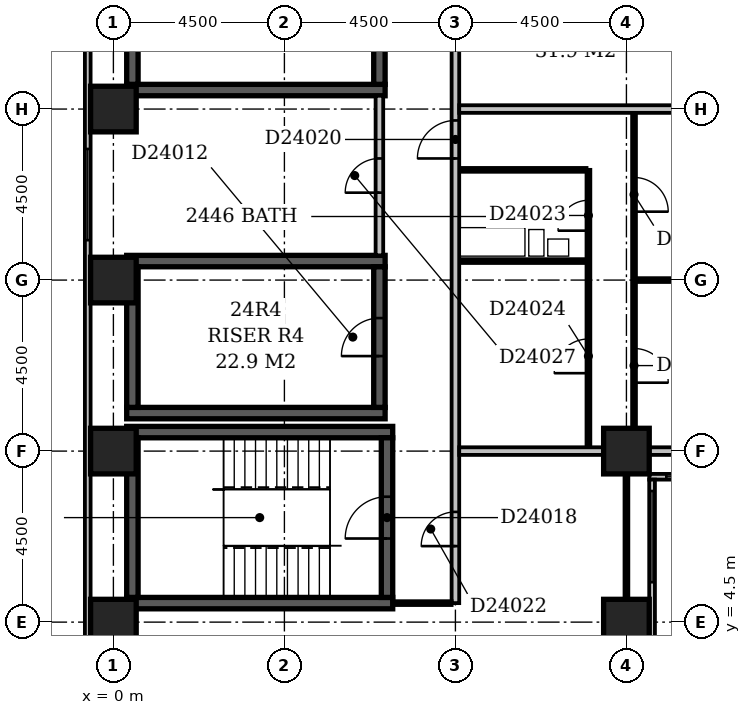
"""IFC4 building model, lengths in metres.
Left out: names, types, materials, properties, quantities, classifications, styles, units other than length and angle.
Written with IfcOpenShell. Run it as: python <this file> out.ifc"""

import sys

from ifc_helpers import new_model, si_unit, direction, frame, frame_2d, origin, origin_2d, place, context, subcontext, project, spatial, rectangle, extrude, element, fill, save


model = new_model("IFC4")
c1 = context("Model", 3, precision=1e-05, world=origin(), true_north=direction((0.0, 1.0)))
c2 = subcontext(c1, "Body", "Model", "MODEL_VIEW")
j1 = project(units=[si_unit("LENGTHUNIT", "METRE"), si_unit("PLANEANGLEUNIT", "RADIAN")], contexts=[c1])
p1 = place(None, origin())
s1 = spatial("IfcSite", under=j1, at=p1, CompositionType="ELEMENT")
p2 = place(p1, origin())
s2 = spatial("IfcBuilding", under=s1, at=p2, CompositionType="ELEMENT")
p3 = place(p2, frame((0.0, 0.0, 97.4)))
s3 = spatial("IfcBuildingStorey", under=s2, at=p3, CompositionType="ELEMENT", Elevation=97.4)
for number, where, z_axis, x_axis in (
    (1, (0.35, 5.0, -0.3), (0.0, 0.0, 1.0), (1.0, 0.0, 0.0)),
    (2, (0.35, 9.5, -0.3), (0.0, 0.0, 1.0), (1.0, 0.0, 0.0)),
):
    element("IfcWall", number, at=place(p3, frame(where, z_axis=z_axis, x_axis=x_axis)), inside=s3, PredefinedType="SHEAR", context=c2, shape_type="SweptSolid", body=[
        extrude(rectangle(XDim=7.0, YDim=0.3, at=frame_2d((3.5, 0.0))), origin(), (0.0, 0.0, 1.0), 3.6),
    ])
for number, where, z_axis, x_axis in (
    (3, (0.35, 10.0, -0.3), (0.0, 0.0, 1.0), (1.0, 0.0, 0.0)),
    (4, (0.35, 14.0, -0.3), (0.0, 0.0, 1.0), (1.0, 0.0, 0.0)),
    (5, (0.35, 18.5, -0.3), (0.0, 0.0, 1.0), (1.0, 0.0, 0.0)),
):
    element("IfcWall", number, at=place(p3, frame(where, z_axis=z_axis, x_axis=x_axis)), inside=s3, PredefinedType="SHEAR", context=c2, shape_type="SweptSolid", body=[
        extrude(rectangle(XDim=6.8, YDim=0.3, at=frame_2d((3.4, 0.0))), origin(), (0.0, 0.0, 1.0), 3.6),
    ])
p4 = place(p3, frame((0.5, 5.15, -0.3), z_axis=(0.0, 0.0, 1.0), x_axis=(0.0, 1.0, 0.0)))
e6 = element("IfcWall", 6, at=p4, inside=s3, PredefinedType="SHEAR", context=c2, shape_type="SweptSolid", body=[
    extrude(rectangle(XDim=4.2, YDim=0.3, at=frame_2d((2.1, 0.0))), origin(), (0.0, 0.0, 1.0), 3.6),
])
for number, where, z_axis, x_axis in (
    (7, (0.5, 10.15, -0.3), (0.0, 0.0, 1.0), (0.0, 1.0, 0.0)),
    (8, (0.5, 18.65, -0.3), (0.0, 0.0, 1.0), (0.0, 1.0, 0.0)),
):
    element("IfcWall", number, at=place(p3, frame(where, z_axis=z_axis, x_axis=x_axis)), inside=s3, PredefinedType="SHEAR", context=c2, shape_type="SweptSolid", body=[
        extrude(rectangle(XDim=3.7, YDim=0.3, at=frame_2d((1.85, 0.0))), origin(), (0.0, 0.0, 1.0), 3.6),
    ])
p5 = place(p3, frame((7.0, 10.15, -0.3), z_axis=(0.0, 0.0, 1.0), x_axis=(0.0, 1.0, 0.0)))
e9 = element("IfcWall", 9, at=p5, inside=s3, PredefinedType="SHEAR", context=c2, shape_type="SweptSolid", body=[
    extrude(rectangle(XDim=3.7, YDim=0.3, at=frame_2d((1.85, 0.0))), origin(), (0.0, 0.0, 1.0), 3.6),
])
p6 = place(p5, frame((1.35, 0.0, 0.3)))
e10 = element("IfcOpeningElement", 10, at=p6, cuts=e9, PredefinedType="OPENING", context=c2, shape_type="SweptSolid", body=[
    extrude(rectangle(XDim=1.0, YDim=2.1, at=frame_2d((0.5, 1.05))), frame((0.0, 0.162, 0.0), z_axis=(0.0, -1.0, 0.0), x_axis=(1.0, 0.0, 0.0)), (0.0, 0.0, 1.0), 0.324),
])
p7 = place(p3, frame((7.0, 18.65, -0.3), z_axis=(0.0, 0.0, 1.0), x_axis=(0.0, 1.0, 0.0)))
e11 = element("IfcWall", 11, at=p7, inside=s3, PredefinedType="SHEAR", context=c2, shape_type="SweptSolid", body=[
    extrude(rectangle(XDim=3.7, YDim=0.3, at=frame_2d((1.85, 0.0))), origin(), (0.0, 0.0, 1.0), 3.6),
])
p8 = place(p7, frame((1.35, 0.0, 0.3)))
e12 = element("IfcOpeningElement", 12, at=p8, cuts=e11, PredefinedType="OPENING", context=c2, shape_type="SweptSolid", body=[
    extrude(rectangle(XDim=1.0, YDim=2.1, at=frame_2d((0.5, 1.05))), frame((0.0, 0.162, 0.0), z_axis=(0.0, -1.0, 0.0), x_axis=(1.0, 0.0, 0.0)), (0.0, 0.0, 1.0), 0.324),
])
p9 = place(p3, frame((7.2, 5.15, -0.3), z_axis=(0.0, 0.0, 1.0), x_axis=(0.0, 1.0, 0.0)))
e13 = element("IfcWall", 13, at=p9, inside=s3, PredefinedType="SHEAR", context=c2, shape_type="SweptSolid", body=[
    extrude(rectangle(XDim=4.2, YDim=0.3, at=frame_2d((2.1, 0.0))), origin(), (0.0, 0.0, 1.0), 3.6),
])
p10 = place(p9, frame((1.55, 0.0, 0.3)))
e14 = element("IfcOpeningElement", 14, at=p10, cuts=e13, PredefinedType="OPENING", context=c2, shape_type="SweptSolid", body=[
    extrude(rectangle(XDim=1.1, YDim=2.1, at=frame_2d((0.55, 1.05))), frame((0.0, 0.162, 0.0), z_axis=(0.0, -1.0, 0.0), x_axis=(1.0, 0.0, 0.0)), (0.0, 0.0, 1.0), 0.324),
])
for number, where, z_axis, x_axis in (
    (15, (0.0, 4.5, -0.3), (0.0, 0.0, 1.0), (1.0, 0.0, 0.0)),
    (16, (13.5, 4.5, -0.3), (0.0, 0.0, 1.0), (1.0, 0.0, 0.0)),
    (17, (0.0, 9.0, -0.3), (0.0, 0.0, 1.0), (1.0, 0.0, 0.0)),
    (18, (13.5, 9.0, -0.3), (0.0, 0.0, 1.0), (1.0, 0.0, 0.0)),
    (19, (0.0, 13.5, -0.3), (0.0, 0.0, 1.0), (1.0, 0.0, 0.0)),
    (20, (0.0, 18.0, -0.3), (0.0, 0.0, 1.0), (1.0, 0.0, 0.0)),
):
    element("IfcColumn", number, at=place(p3, frame(where, z_axis=z_axis, x_axis=x_axis)), inside=s3, PredefinedType="COLUMN", context=c2, shape_type="SweptSolid", body=[
        extrude(rectangle(XDim=1.2, YDim=1.2, at=origin_2d()), origin(), (0.0, 0.0, 1.0), 3.6),
    ])
p11 = place(p3, frame((14.175, 3.9, 0.0), z_axis=(0.0, 0.0, 1.0), x_axis=(0.0, 1.0, 0.0)))
e21 = element("IfcWall", 21, at=p11, inside=s3, PredefinedType="STANDARD", context=c2, shape_type="SweptSolid", body=[
    extrude(rectangle(XDim=4.35, YDim=0.15, at=frame_2d((2.175, 0.0))), origin(), (0.0, 0.0, 1.0), 2.7),
])
p12 = place(p11, frame((1.65, 0.0, 0.6)))
e22 = element("IfcOpeningElement", 22, at=p12, cuts=e21, PredefinedType="OPENING", context=c2, shape_type="SweptSolid", body=[
    extrude(rectangle(XDim=2.4, YDim=1.8, at=frame_2d((1.2, 0.9))), frame((0.0, 0.087, 0.0), z_axis=(0.0, -1.0, 0.0), x_axis=(1.0, 0.0, 0.0)), (0.0, 0.0, 1.0), 0.174),
])
p13 = place(p3, frame((14.1, 8.325, 0.0), z_axis=(0.0, 0.0, 1.0), x_axis=(1.0, 0.0, 0.0)))
e23 = element("IfcWall", 23, at=p13, inside=s3, PredefinedType="STANDARD", context=c2, shape_type="SweptSolid", body=[
    extrude(rectangle(XDim=4.65, YDim=0.15, at=frame_2d((2.325, 0.0))), origin(), (0.0, 0.0, 1.0), 2.7),
])
p14 = place(p13, frame((0.45, 0.0, 0.6)))
e24 = element("IfcOpeningElement", 24, at=p14, cuts=e23, PredefinedType="OPENING", context=c2, shape_type="SweptSolid", body=[
    extrude(rectangle(XDim=2.4, YDim=1.8, at=frame_2d((1.2, 0.9))), frame((0.0, 0.087, 0.0), z_axis=(0.0, -1.0, 0.0), x_axis=(1.0, 0.0, 0.0)), (0.0, 0.0, 1.0), 0.174),
])
p15 = place(p3, frame((-0.675, 59.1, 0.0), z_axis=(0.0, 0.0, 1.0), x_axis=(0.0, -1.0, 0.0)))
e25 = element("IfcWall", 25, at=p15, inside=s3, PredefinedType="STANDARD", context=c2, shape_type="SweptSolid", body=[
    extrude(rectangle(XDim=55.35, YDim=0.15, at=frame_2d((27.675, 0.0))), origin(), (0.0, 0.0, 1.0), 2.7),
])
p16 = place(p15, frame((10.65, 0.0, 0.6)))
e26 = element("IfcOpeningElement", 26, at=p16, cuts=e25, PredefinedType="OPENING", context=c2, shape_type="SweptSolid", body=[
    extrude(rectangle(XDim=2.4, YDim=1.8, at=frame_2d((1.2, 0.9))), frame((0.0, 0.087, 0.0), z_axis=(0.0, -1.0, 0.0), x_axis=(1.0, 0.0, 0.0)), (0.0, 0.0, 1.0), 0.174),
])
p17 = place(p15, frame((15.15, 0.0, 0.6)))
e27 = element("IfcOpeningElement", 27, at=p17, cuts=e25, PredefinedType="OPENING", context=c2, shape_type="SweptSolid", body=[
    extrude(rectangle(XDim=2.4, YDim=1.8, at=frame_2d((1.2, 0.9))), frame((0.0, 0.087, 0.0), z_axis=(0.0, -1.0, 0.0), x_axis=(1.0, 0.0, 0.0)), (0.0, 0.0, 1.0), 0.174),
])
p18 = place(p15, frame((19.65, 0.0, 0.6)))
e28 = element("IfcOpeningElement", 28, at=p18, cuts=e25, PredefinedType="OPENING", context=c2, shape_type="SweptSolid", body=[
    extrude(rectangle(XDim=2.4, YDim=1.8, at=frame_2d((1.2, 0.9))), frame((0.0, 0.087, 0.0), z_axis=(0.0, -1.0, 0.0), x_axis=(1.0, 0.0, 0.0)), (0.0, 0.0, 1.0), 0.174),
])
p19 = place(p15, frame((42.15, 0.0, 0.6)))
e29 = element("IfcOpeningElement", 29, at=p19, cuts=e25, PredefinedType="OPENING", context=c2, shape_type="SweptSolid", body=[
    extrude(rectangle(XDim=2.4, YDim=1.8, at=frame_2d((1.2, 0.9))), frame((0.0, 0.087, 0.0), z_axis=(0.0, -1.0, 0.0), x_axis=(1.0, 0.0, 0.0)), (0.0, 0.0, 1.0), 0.174),
])
p20 = place(p3, frame((0.0, 4.4, 0.0), z_axis=(0.0, 0.0, 1.0), x_axis=(0.0, 1.0, 0.0)))
e30 = element("IfcWall", 30, at=p20, inside=s3, PredefinedType="PARTITIONING", context=c2, shape_type="SweptSolid", body=[
    extrude(rectangle(XDim=0.7, YDim=0.1, at=frame_2d((0.35, 0.0))), origin(), (0.0, 0.0, 1.0), 2.7),
])
p21 = place(p3, frame((7.349, 5.0, 0.0), z_axis=(0.0, 0.0, 1.0), x_axis=(1.0, 0.0, 0.0)))
e31 = element("IfcWall", 31, at=p21, inside=s3, PredefinedType="PARTITIONING", context=c2, shape_type="SweptSolid", body=[
    extrude(rectangle(XDim=1.551, YDim=0.1, at=frame_2d((0.775, 0.0))), origin(), (0.0, 0.0, 1.0), 3.3),
])
p22 = place(p3, frame((9.0, 5.0, 0.0), z_axis=(0.0, 0.0, 1.0), x_axis=(0.0, 1.0, 0.0)))
e32 = element("IfcWall", 32, at=p22, inside=s3, PredefinedType="PARTITIONING", context=c2, shape_type="SweptSolid", body=[
    extrude(rectangle(XDim=44.5, YDim=0.2, at=frame_2d((22.25, 0.0))), origin(), (0.0, 0.0, 1.0), 3.3),
])
p23 = place(p22, frame((18.4, 0.0, 0.0)))
e33 = element("IfcOpeningElement", 33, at=p23, cuts=e32, PredefinedType="OPENING", context=c2, shape_type="SweptSolid", body=[
    extrude(rectangle(XDim=1.0, YDim=2.1, at=frame_2d((0.5, 1.05))), frame((0.0, 0.112, 0.0), z_axis=(0.0, -1.0, 0.0), x_axis=(1.0, 0.0, 0.0)), (0.0, 0.0, 1.0), 0.224),
])
p24 = place(p22, frame((11.7, 0.0, 0.0)))
e34 = element("IfcOpeningElement", 34, at=p24, cuts=e32, PredefinedType="OPENING", context=c2, shape_type="SweptSolid", body=[
    extrude(rectangle(XDim=1.0, YDim=2.1, at=frame_2d((0.5, 1.05))), frame((0.0, 0.112, 0.0), z_axis=(0.0, -1.0, 0.0), x_axis=(1.0, 0.0, 0.0)), (0.0, 0.0, 1.0), 0.224),
])
p25 = place(p22, frame((37.25, 0.0, 0.0)))
e35 = element("IfcOpeningElement", 35, at=p25, cuts=e32, PredefinedType="OPENING", context=c2, shape_type="SweptSolid", body=[
    extrude(rectangle(XDim=0.9, YDim=2.1, at=frame_2d((0.45, 1.05))), frame((0.0, 0.112, 0.0), z_axis=(0.0, -1.0, 0.0), x_axis=(1.0, 0.0, 0.0)), (0.0, 0.0, 1.0), 0.224),
])
p26 = place(p22, frame((1.5, 0.0, 0.0)))
e36 = element("IfcOpeningElement", 36, at=p26, cuts=e32, PredefinedType="OPENING", context=c2, shape_type="SweptSolid", body=[
    extrude(rectangle(XDim=0.9, YDim=2.1, at=frame_2d((0.45, 1.05))), frame((0.0, 0.112, 0.0), z_axis=(0.0, -1.0, 0.0), x_axis=(1.0, 0.0, 0.0)), (0.0, 0.0, 1.0), 0.224),
])
p27 = place(p3, frame((13.5, 5.1, 0.0), z_axis=(0.0, 0.0, 1.0), x_axis=(0.0, 1.0, 0.0)))
e37 = element("IfcWall", 37, at=p27, inside=s3, PredefinedType="PARTITIONING", context=c2, shape_type="SweptSolid", body=[
    extrude(rectangle(XDim=3.3, YDim=0.1, at=frame_2d((1.65, 0.0))), origin(), (0.0, 0.0, 1.0), 2.7),
])
p28 = place(p3, frame((9.1, 9.0, 0.0), z_axis=(0.0, 0.0, 1.0), x_axis=(1.0, 0.0, 0.0)))
e38 = element("IfcWall", 38, at=p28, inside=s3, PredefinedType="PARTITIONING", context=c2, shape_type="SweptSolid", body=[
    extrude(rectangle(XDim=3.8, YDim=0.2, at=frame_2d((1.9, 0.0))), origin(), (0.0, 0.0, 1.0), 3.3),
])
p29 = place(p3, frame((14.1, 9.0, 0.0), z_axis=(0.0, 0.0, 1.0), x_axis=(1.0, 0.0, 0.0)))
e39 = element("IfcWall", 39, at=p29, inside=s3, PredefinedType="PARTITIONING", context=c2, shape_type="SweptSolid", body=[
    extrude(rectangle(XDim=3.3, YDim=0.2, at=frame_2d((1.65, 0.0))), origin(), (0.0, 0.0, 1.0), 2.7),
])
p30 = place(p3, frame((12.5, 9.1, 0.0), z_axis=(0.0, 0.0, 1.0), x_axis=(0.0, 1.0, 0.0)))
e40 = element("IfcWall", 40, at=p30, inside=s3, PredefinedType="PARTITIONING", context=c2, shape_type="SweptSolid", body=[
    extrude(rectangle(XDim=7.3, YDim=0.1, at=frame_2d((3.65, 0.0))), origin(), (0.0, 0.0, 1.0), 3.3),
])
p31 = place(p30, frame((5.7, 0.0, 0.0)))
e41 = element("IfcOpeningElement", 41, at=p31, cuts=e40, PredefinedType="OPENING", context=c2, shape_type="SweptSolid", body=[
    extrude(rectangle(XDim=0.8, YDim=2.1, at=frame_2d((0.4, 1.05))), frame((0.0, 0.062, 0.0), z_axis=(0.0, -1.0, 0.0), x_axis=(1.0, 0.0, 0.0)), (0.0, 0.0, 1.0), 0.124),
])
p32 = place(p30, frame((1.95, 0.0, 0.0)))
e42 = element("IfcOpeningElement", 42, at=p32, cuts=e40, PredefinedType="OPENING", context=c2, shape_type="SweptSolid", body=[
    extrude(rectangle(XDim=0.9, YDim=2.1, at=frame_2d((0.45, 1.05))), frame((0.0, 0.062, 0.0), z_axis=(0.0, -1.0, 0.0), x_axis=(1.0, 0.0, 0.0)), (0.0, 0.0, 1.0), 0.124),
])
p33 = place(p3, frame((13.7, 9.6, 0.0), z_axis=(0.0, 0.0, 1.0), x_axis=(0.0, 1.0, 0.0)))
e43 = element("IfcWall", 43, at=p33, inside=s3, PredefinedType="PARTITIONING", context=c2, shape_type="SweptSolid", body=[
    extrude(rectangle(XDim=8.3, YDim=0.1, at=frame_2d((4.15, 0.0))), origin(), (0.0, 0.0, 1.0), 3.3),
])
p34 = place(p33, frame((1.2, 0.0, 0.0)))
e44 = element("IfcOpeningElement", 44, at=p34, cuts=e43, PredefinedType="OPENING", context=c2, shape_type="SweptSolid", body=[
    extrude(rectangle(XDim=0.9, YDim=2.1, at=frame_2d((0.45, 1.05))), frame((0.0, 0.062, 0.0), z_axis=(0.0, -1.0, 0.0), x_axis=(1.0, 0.0, 0.0)), (0.0, 0.0, 1.0), 0.124),
])
p35 = place(p33, frame((5.7, 0.0, 0.0)))
e45 = element("IfcOpeningElement", 45, at=p35, cuts=e43, PredefinedType="OPENING", context=c2, shape_type="SweptSolid", body=[
    extrude(rectangle(XDim=0.9, YDim=2.1, at=frame_2d((0.45, 1.05))), frame((0.0, 0.062, 0.0), z_axis=(0.0, -1.0, 0.0), x_axis=(1.0, 0.0, 0.0)), (0.0, 0.0, 1.0), 0.124),
])
p36 = place(p3, frame((13.75, 13.5, 0.0), z_axis=(0.0, 0.0, 1.0), x_axis=(1.0, 0.0, 0.0)))
e46 = element("IfcWall", 46, at=p36, inside=s3, PredefinedType="PARTITIONING", context=c2, shape_type="SweptSolid", body=[
    extrude(rectangle(XDim=3.65, YDim=0.1, at=frame_2d((1.825, 0.0))), origin(), (0.0, 0.0, 1.0), 3.3),
])
p37 = place(p3, frame((9.1, 14.0, 0.0), z_axis=(0.0, 0.0, 1.0), x_axis=(1.0, 0.0, 0.0)))
e47 = element("IfcWall", 47, at=p37, inside=s3, PredefinedType="PLUMBINGWALL", context=c2, shape_type="SweptSolid", body=[
    extrude(rectangle(XDim=3.35, YDim=0.1, at=frame_2d((1.675, 0.0))), origin(), (0.0, 0.0, 1.0), 3.3),
])
p38 = place(p3, frame((7.0, 14.15, 0.0), z_axis=(0.0, 0.0, 1.0), x_axis=(0.0, 1.0, 0.0)))
e48 = element("IfcWall", 48, at=p38, inside=s3, PredefinedType="PARTITIONING", context=c2, shape_type="SweptSolid", body=[
    extrude(rectangle(XDim=4.2, YDim=0.2, at=frame_2d((2.1, 0.0))), origin(), (0.0, 0.0, 1.0), 3.3),
])
p39 = place(p38, frame((1.65, 0.0, 0.0)))
e49 = element("IfcOpeningElement", 49, at=p39, cuts=e48, PredefinedType="OPENING", context=c2, shape_type="SweptSolid", body=[
    extrude(rectangle(XDim=0.9, YDim=2.1, at=frame_2d((0.45, 1.05))), frame((0.0, 0.112, 0.0), z_axis=(0.0, -1.0, 0.0), x_axis=(1.0, 0.0, 0.0)), (0.0, 0.0, 1.0), 0.224),
])
p40 = place(p3, frame((9.1, 16.4, 0.0), z_axis=(0.0, 0.0, 1.0), x_axis=(1.0, 0.0, 0.0)))
e50 = element("IfcWall", 50, at=p40, inside=s3, PredefinedType="PLUMBINGWALL", context=c2, shape_type="SweptSolid", body=[
    extrude(rectangle(XDim=3.35, YDim=0.1, at=frame_2d((1.675, 0.0))), origin(), (0.0, 0.0, 1.0), 3.3),
])
p41 = place(p3, frame((9.1, 18.0, 0.0), z_axis=(0.0, 0.0, 1.0), x_axis=(1.0, 0.0, 0.0)))
e51 = element("IfcWall", 51, at=p41, inside=s3, PredefinedType="PARTITIONING", context=c2, shape_type="SweptSolid", body=[
    extrude(rectangle(XDim=8.3, YDim=0.2, at=frame_2d((4.15, 0.0))), origin(), (0.0, 0.0, 1.0), 2.6),
])
p42 = place(p12, origin())
e52 = element("IfcWindow", 52, at=p42, inside=s3, PartitioningType="SINGLE_PANEL", PredefinedType="WINDOW", context=c2, shape_type="SweptSolid", body=[
    extrude(rectangle(XDim=2.4, YDim=1.8, at=frame_2d((1.2, 0.9))), frame((0.0, 0.03, 0.0), z_axis=(0.0, -1.0, 0.0), x_axis=(1.0, 0.0, 0.0)), (0.0, 0.0, 1.0), 0.06),
])
fill(e22, e52)
p43 = place(p14, origin())
e53 = element("IfcWindow", 53, at=p43, inside=s3, PartitioningType="SINGLE_PANEL", PredefinedType="WINDOW", context=c2, shape_type="SweptSolid", body=[
    extrude(rectangle(XDim=2.4, YDim=1.8, at=frame_2d((1.2, 0.9))), frame((0.0, 0.03, 0.0), z_axis=(0.0, -1.0, 0.0), x_axis=(1.0, 0.0, 0.0)), (0.0, 0.0, 1.0), 0.06),
])
fill(e24, e53)
p44 = place(p19, origin())
e54 = element("IfcWindow", 54, at=p44, inside=s3, PartitioningType="SINGLE_PANEL", PredefinedType="WINDOW", context=c2, shape_type="SweptSolid", body=[
    extrude(rectangle(XDim=2.4, YDim=1.8, at=frame_2d((1.2, 0.9))), frame((0.0, 0.03, 0.0), z_axis=(0.0, -1.0, 0.0), x_axis=(1.0, 0.0, 0.0)), (0.0, 0.0, 1.0), 0.06),
])
fill(e29, e54)
p45 = place(p6, origin())
e55 = element("IfcDoor", 55, at=p45, inside=s3, OperationType="SINGLE_SWING_LEFT", PredefinedType="DOOR", context=c2, shape_type="SweptSolid", body=[
    extrude(rectangle(XDim=1.0, YDim=2.1, at=frame_2d((0.5, 1.05))), frame((0.0, 0.025, 0.0), z_axis=(0.0, -1.0, 0.0), x_axis=(1.0, 0.0, 0.0)), (0.0, 0.0, 1.0), 0.05),
])
fill(e10, e55)
p46 = place(p10, origin())
e56 = element("IfcDoor", 56, at=p46, inside=s3, OperationType="SINGLE_SWING_LEFT", PredefinedType="DOOR", context=c2, shape_type="SweptSolid", body=[
    extrude(rectangle(XDim=1.1, YDim=2.1, at=frame_2d((0.55, 1.05))), frame((0.0, 0.025, 0.0), z_axis=(0.0, -1.0, 0.0), x_axis=(1.0, 0.0, 0.0)), (0.0, 0.0, 1.0), 0.05),
])
fill(e14, e56)
p47 = place(p24, origin())
e57 = element("IfcDoor", 57, at=p47, inside=s3, OperationType="SINGLE_SWING_LEFT", PredefinedType="DOOR", context=c2, shape_type="SweptSolid", body=[
    extrude(rectangle(XDim=1.0, YDim=2.1, at=frame_2d((0.5, 1.05))), frame((0.0, 0.025, 0.0), z_axis=(0.0, -1.0, 0.0), x_axis=(1.0, 0.0, 0.0)), (0.0, 0.0, 1.0), 0.05),
])
fill(e34, e57)
p48 = place(p26, origin())
e58 = element("IfcDoor", 58, at=p48, inside=s3, OperationType="SINGLE_SWING_LEFT", PredefinedType="DOOR", context=c2, shape_type="SweptSolid", body=[
    extrude(rectangle(XDim=0.9, YDim=2.1, at=frame_2d((0.45, 1.05))), frame((0.0, 0.025, 0.0), z_axis=(0.0, -1.0, 0.0), x_axis=(1.0, 0.0, 0.0)), (0.0, 0.0, 1.0), 0.05),
])
fill(e36, e58)
p49 = place(p31, origin())
e59 = element("IfcDoor", 59, at=p49, inside=s3, OperationType="SINGLE_SWING_LEFT", PredefinedType="DOOR", context=c2, shape_type="SweptSolid", body=[
    extrude(rectangle(XDim=0.8, YDim=2.1, at=frame_2d((0.4, 1.05))), frame((0.0, 0.025, 0.0), z_axis=(0.0, -1.0, 0.0), x_axis=(1.0, 0.0, 0.0)), (0.0, 0.0, 1.0), 0.05),
])
fill(e41, e59)
p50 = place(p32, origin())
e60 = element("IfcDoor", 60, at=p50, inside=s3, OperationType="SINGLE_SWING_LEFT", PredefinedType="DOOR", context=c2, shape_type="SweptSolid", body=[
    extrude(rectangle(XDim=0.9, YDim=2.1, at=frame_2d((0.45, 1.05))), frame((0.0, 0.025, 0.0), z_axis=(0.0, -1.0, 0.0), x_axis=(1.0, 0.0, 0.0)), (0.0, 0.0, 1.0), 0.05),
])
fill(e42, e60)
p51 = place(p34, frame((0.9, 0.0, 0.0), z_axis=(0.0, 0.0, 1.0), x_axis=(-1.0, 0.0, 0.0)))
e61 = element("IfcDoor", 61, at=p51, inside=s3, OperationType="SINGLE_SWING_RIGHT", PredefinedType="DOOR", context=c2, shape_type="SweptSolid", body=[
    extrude(rectangle(XDim=0.9, YDim=2.1, at=frame_2d((0.45, 1.05))), frame((0.0, 0.025, 0.0), z_axis=(0.0, -1.0, 0.0), x_axis=(1.0, 0.0, 0.0)), (0.0, 0.0, 1.0), 0.05),
])
fill(e44, e61)
p52 = place(p35, frame((0.9, 0.0, 0.0), z_axis=(0.0, 0.0, 1.0), x_axis=(-1.0, 0.0, 0.0)))
e62 = element("IfcDoor", 62, at=p52, inside=s3, OperationType="SINGLE_SWING_RIGHT", PredefinedType="DOOR", context=c2, shape_type="SweptSolid", body=[
    extrude(rectangle(XDim=0.9, YDim=2.1, at=frame_2d((0.45, 1.05))), frame((0.0, 0.025, 0.0), z_axis=(0.0, -1.0, 0.0), x_axis=(1.0, 0.0, 0.0)), (0.0, 0.0, 1.0), 0.05),
])
fill(e45, e62)
p53 = place(p39, origin())
e63 = element("IfcDoor", 63, at=p53, inside=s3, OperationType="SINGLE_SWING_LEFT", PredefinedType="DOOR", context=c2, shape_type="SweptSolid", body=[
    extrude(rectangle(XDim=0.9, YDim=2.1, at=frame_2d((0.45, 1.05))), frame((0.0, 0.025, 0.0), z_axis=(0.0, -1.0, 0.0), x_axis=(1.0, 0.0, 0.0)), (0.0, 0.0, 1.0), 0.05),
])
fill(e49, e63)
save(model, sys.argv[1])
